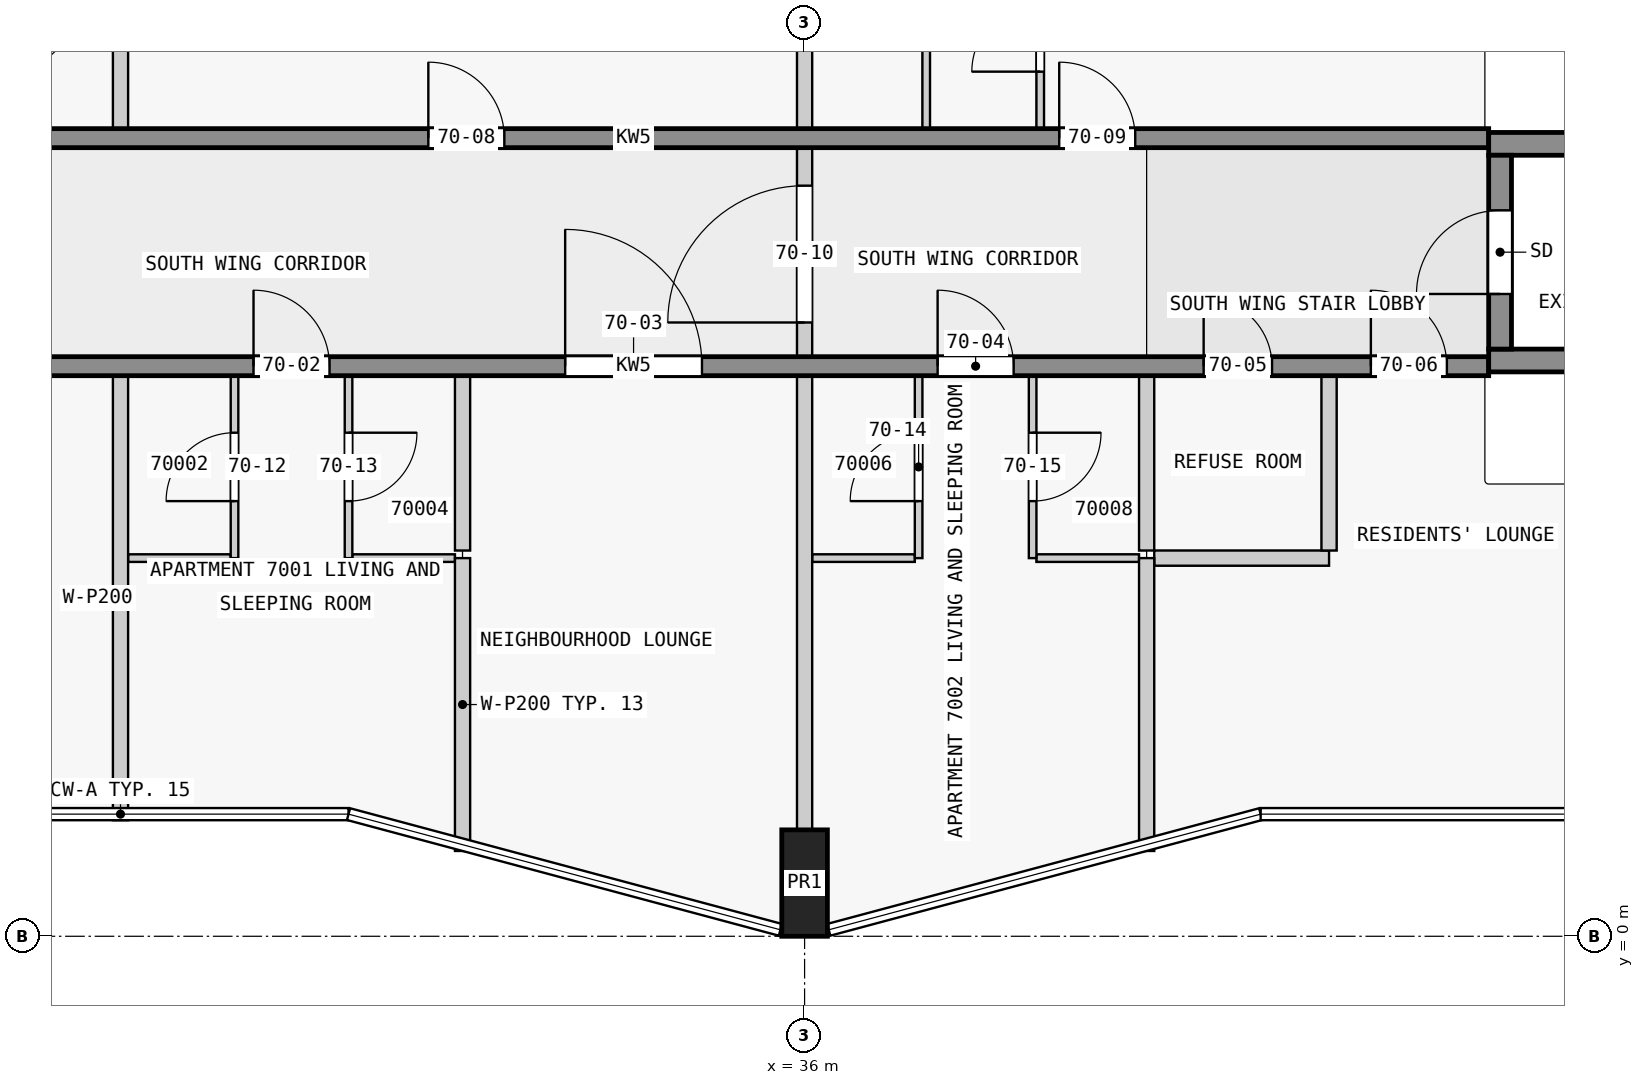
"""IFC4 building model, lengths in metres.
Left out: names, types, materials, properties, quantities, classifications, styles, units other than length and angle.
Written with IfcOpenShell. Run it as: python <this file> out.ifc"""

import sys

from ifc_helpers import new_model, si_unit, direction, frame, frame_2d, origin, origin_2d, place, context, subcontext, project, spatial, rectangle, extrude, element, fill, save


model = new_model("IFC4")
c1 = context("Model", 3, precision=1e-05, world=origin(), true_north=direction((0.0, 1.0)))
c2 = subcontext(c1, "Body", "Model", "MODEL_VIEW")
j1 = project(units=[si_unit("LENGTHUNIT", "METRE"), si_unit("PLANEANGLEUNIT", "RADIAN")], contexts=[c1])
p1 = place(None, origin())
s1 = spatial("IfcSite", under=j1, at=p1, CompositionType="ELEMENT")
p2 = place(p1, origin())
s2 = spatial("IfcBuilding", under=s1, at=p2, CompositionType="ELEMENT")
p3 = place(p2, frame((0.0, 0.0, 266.9)))
s3 = spatial("IfcBuildingStorey", under=s2, at=p3, CompositionType="ELEMENT", Elevation=266.9)
p4 = place(p3, frame((36.0, 0.7, 0.0), z_axis=(0.0, 0.0, 1.0), x_axis=(1.0, 0.0, 0.0)))
e1 = element("IfcColumn", 1, at=p4, inside=s3, PredefinedType="COLUMN", context=c2, shape_type="SweptSolid", body=[
    extrude(rectangle(XDim=0.6, YDim=1.4, at=origin_2d()), origin(), (0.0, 0.0, 1.0), 3.5),
])
p5 = place(p3, frame((45.15, 7.725, 0.0), z_axis=(0.0, 0.0, 1.0), x_axis=(0.0, 1.0, 0.0)))
e2 = element("IfcWall", 2, at=p5, inside=s3, PredefinedType="SHEAR", context=c2, shape_type="SweptSolid", body=[
    extrude(rectangle(XDim=2.55, YDim=0.3, at=frame_2d((1.275, 0.0))), origin(), (0.0, 0.0, 1.0), 3.5),
])
p6 = place(p5, frame((0.725, 0.0, 0.0)))
e3 = element("IfcOpeningElement", 3, at=p6, cuts=e2, PredefinedType="OPENING", context=c2, shape_type="SweptSolid", body=[
    extrude(rectangle(XDim=1.1, YDim=2.1, at=frame_2d((0.55, 1.05))), frame((0.0, 0.16, 0.0), z_axis=(0.0, -1.0, 0.0), x_axis=(1.0, 0.0, 0.0)), (0.0, 0.0, 1.0), 0.32),
])
for number, where, z_axis, x_axis in (
    (4, (45.0, 7.575, 0.0), (0.0, 0.0, 1.0), (1.0, 0.0, 0.0)),
    (5, (45.0, 10.425, 0.0), (0.0, 0.0, 1.0), (1.0, 0.0, 0.0)),
):
    element("IfcWall", number, at=place(p3, frame(where, z_axis=z_axis, x_axis=x_axis)), inside=s3, PredefinedType="SHEAR", context=c2, shape_type="SweptSolid", body=[
        extrude(rectangle(XDim=7.2, YDim=0.3, at=frame_2d((3.6, 0.0))), origin(), (0.0, 0.0, 1.0), 3.5),
    ])
p7 = place(p3, frame((22.5, 7.5, 0.0), z_axis=(0.0, 0.0, 1.0), x_axis=(1.0, 0.0, 0.0)))
e6 = element("IfcWall", 6, at=p7, inside=s3, PredefinedType="SHEAR", context=c2, shape_type="SweptSolid", body=[
    extrude(rectangle(XDim=22.5, YDim=0.25, at=frame_2d((11.25, 0.0))), origin(), (0.0, 0.0, 1.0), 3.25),
])
p8 = place(p7, frame((1.75, 0.0, 0.0)))
e7 = element("IfcOpeningElement", 7, at=p8, cuts=e6, PredefinedType="OPENING", context=c2, shape_type="SweptSolid", body=[
    extrude(rectangle(XDim=1.0, YDim=2.1, at=frame_2d((0.5, 1.05))), frame((0.0, 0.135, 0.0), z_axis=(0.0, -1.0, 0.0), x_axis=(1.0, 0.0, 0.0)), (0.0, 0.0, 1.0), 0.27),
])
p9 = place(p7, frame((6.25, 0.0, 0.0)))
e8 = element("IfcOpeningElement", 8, at=p9, cuts=e6, PredefinedType="OPENING", context=c2, shape_type="SweptSolid", body=[
    extrude(rectangle(XDim=1.0, YDim=2.1, at=frame_2d((0.5, 1.05))), frame((0.0, 0.135, 0.0), z_axis=(0.0, -1.0, 0.0), x_axis=(1.0, 0.0, 0.0)), (0.0, 0.0, 1.0), 0.27),
])
p10 = place(p7, frame((10.35, 0.0, 0.0)))
e9 = element("IfcOpeningElement", 9, at=p10, cuts=e6, PredefinedType="OPENING", context=c2, shape_type="SweptSolid", body=[
    extrude(rectangle(XDim=1.8, YDim=2.1, at=frame_2d((0.9, 1.05))), frame((0.0, 0.135, 0.0), z_axis=(0.0, -1.0, 0.0), x_axis=(1.0, 0.0, 0.0)), (0.0, 0.0, 1.0), 0.27),
])
p11 = place(p7, frame((15.25, 0.0, 0.0)))
e10 = element("IfcOpeningElement", 10, at=p11, cuts=e6, PredefinedType="OPENING", context=c2, shape_type="SweptSolid", body=[
    extrude(rectangle(XDim=1.0, YDim=2.1, at=frame_2d((0.5, 1.05))), frame((0.0, 0.135, 0.0), z_axis=(0.0, -1.0, 0.0), x_axis=(1.0, 0.0, 0.0)), (0.0, 0.0, 1.0), 0.27),
])
p12 = place(p7, frame((18.75, 0.0, 0.0)))
e11 = element("IfcOpeningElement", 11, at=p12, cuts=e6, PredefinedType="OPENING", context=c2, shape_type="SweptSolid", body=[
    extrude(rectangle(XDim=0.9, YDim=2.1, at=frame_2d((0.45, 1.05))), frame((0.0, 0.135, 0.0), z_axis=(0.0, -1.0, 0.0), x_axis=(1.0, 0.0, 0.0)), (0.0, 0.0, 1.0), 0.27),
])
p13 = place(p7, frame((20.95, 0.0, 0.0)))
e12 = element("IfcOpeningElement", 12, at=p13, cuts=e6, PredefinedType="OPENING", context=c2, shape_type="SweptSolid", body=[
    extrude(rectangle(XDim=1.0, YDim=2.1, at=frame_2d((0.5, 1.05))), frame((0.0, 0.135, 0.0), z_axis=(0.0, -1.0, 0.0), x_axis=(1.0, 0.0, 0.0)), (0.0, 0.0, 1.0), 0.27),
])
p14 = place(p3, frame((22.5, 10.5, 0.0), z_axis=(0.0, 0.0, 1.0), x_axis=(1.0, 0.0, 0.0)))
e13 = element("IfcWall", 13, at=p14, inside=s3, PredefinedType="SHEAR", context=c2, shape_type="SweptSolid", body=[
    extrude(rectangle(XDim=22.5, YDim=0.25, at=frame_2d((11.25, 0.0))), origin(), (0.0, 0.0, 1.0), 3.25),
])
p15 = place(p14, frame((1.75, 0.0, 0.0)))
e14 = element("IfcOpeningElement", 14, at=p15, cuts=e13, PredefinedType="OPENING", context=c2, shape_type="SweptSolid", body=[
    extrude(rectangle(XDim=1.0, YDim=2.1, at=frame_2d((0.5, 1.05))), frame((0.0, 0.135, 0.0), z_axis=(0.0, -1.0, 0.0), x_axis=(1.0, 0.0, 0.0)), (0.0, 0.0, 1.0), 0.27),
])
p16 = place(p14, frame((8.55, 0.0, 0.0)))
e15 = element("IfcOpeningElement", 15, at=p16, cuts=e13, PredefinedType="OPENING", context=c2, shape_type="SweptSolid", body=[
    extrude(rectangle(XDim=1.0, YDim=2.1, at=frame_2d((0.5, 1.05))), frame((0.0, 0.135, 0.0), z_axis=(0.0, -1.0, 0.0), x_axis=(1.0, 0.0, 0.0)), (0.0, 0.0, 1.0), 0.27),
])
p17 = place(p14, frame((16.85, 0.0, 0.0)))
e16 = element("IfcOpeningElement", 16, at=p17, cuts=e13, PredefinedType="OPENING", context=c2, shape_type="SweptSolid", body=[
    extrude(rectangle(XDim=1.0, YDim=2.1, at=frame_2d((0.5, 1.05))), frame((0.0, 0.135, 0.0), z_axis=(0.0, -1.0, 0.0), x_axis=(1.0, 0.0, 0.0)), (0.0, 0.0, 1.0), 0.27),
])
for number, where, z_axis, x_axis in (
    (17, (27.1, 4.975, 0.0), (0.0, 0.0, 1.0), (1.0, 0.0, 0.0)),
    (18, (30.05, 4.975, 0.0), (0.0, 0.0, 1.0), (1.0, 0.0, 0.0)),
    (19, (36.1, 4.975, 0.0), (0.0, 0.0, 1.0), (1.0, 0.0, 0.0)),
    (20, (39.05, 4.975, 0.0), (0.0, 0.0, 1.0), (1.0, 0.0, 0.0)),
):
    element("IfcWall", number, at=place(p3, frame(where, z_axis=z_axis, x_axis=x_axis)), inside=s3, PredefinedType="PARTITIONING", context=c2, shape_type="SweptSolid", body=[
        extrude(rectangle(XDim=1.35, YDim=0.1, at=frame_2d((0.675, 0.0))), origin(), (0.0, 0.0, 1.0), 3.25),
    ])
p18 = place(p3, frame((40.6, 4.975, 0.0), z_axis=(0.0, 0.0, 1.0), x_axis=(1.0, 0.0, 0.0)))
e21 = element("IfcWall", 21, at=p18, inside=s3, PredefinedType="PARTITIONING", context=c2, shape_type="SweptSolid", body=[
    extrude(rectangle(XDim=2.3, YDim=0.2, at=frame_2d((1.15, 0.0))), origin(), (0.0, 0.0, 1.0), 3.25),
])
p19 = place(p3, frame((27.0, 1.527, 0.0), z_axis=(0.0, 0.0, 1.0), x_axis=(0.0, 1.0, 0.0)))
e22 = element("IfcWall", 22, at=p19, inside=s3, PredefinedType="PARTITIONING", context=c2, shape_type="SweptSolid", body=[
    extrude(rectangle(XDim=5.848, YDim=0.2, at=frame_2d((2.924, 0.0))), origin(), (0.0, 0.0, 1.0), 3.25),
])
p20 = place(p3, frame((27.0, 10.625, 0.0), z_axis=(0.0, 0.0, 1.0), x_axis=(0.0, 1.0, 0.0)))
e23 = element("IfcWall", 23, at=p20, inside=s3, PredefinedType="PARTITIONING", context=c2, shape_type="SweptSolid", body=[
    extrude(rectangle(XDim=2.3, YDim=0.2, at=frame_2d((1.15, 0.0))), origin(), (0.0, 0.0, 1.0), 3.25),
])
p21 = place(p3, frame((28.5, 4.975, 0.0), z_axis=(0.0, 0.0, 1.0), x_axis=(0.0, 1.0, 0.0)))
e24 = element("IfcWall", 24, at=p21, inside=s3, PredefinedType="PARTITIONING", context=c2, shape_type="SweptSolid", body=[
    extrude(rectangle(XDim=2.4, YDim=0.1, at=frame_2d((1.2, 0.0))), origin(), (0.0, 0.0, 1.0), 3.25),
])
p22 = place(p21, frame((0.75, 0.0, 0.0)))
e25 = element("IfcOpeningElement", 25, at=p22, cuts=e24, PredefinedType="OPENING", context=c2, shape_type="SweptSolid", body=[
    extrude(rectangle(XDim=0.9, YDim=2.1, at=frame_2d((0.45, 1.05))), frame((0.0, 0.06, 0.0), z_axis=(0.0, -1.0, 0.0), x_axis=(1.0, 0.0, 0.0)), (0.0, 0.0, 1.0), 0.12),
])
p23 = place(p3, frame((30.0, 7.375, 0.0), z_axis=(0.0, 0.0, 1.0), x_axis=(0.0, -1.0, 0.0)))
e26 = element("IfcWall", 26, at=p23, inside=s3, PredefinedType="PARTITIONING", context=c2, shape_type="SweptSolid", body=[
    extrude(rectangle(XDim=2.4, YDim=0.1, at=frame_2d((1.2, 0.0))), origin(), (0.0, 0.0, 1.0), 3.25),
])
p24 = place(p23, frame((0.75, 0.0, 0.0)))
e27 = element("IfcOpeningElement", 27, at=p24, cuts=e26, PredefinedType="OPENING", context=c2, shape_type="SweptSolid", body=[
    extrude(rectangle(XDim=0.9, YDim=2.1, at=frame_2d((0.45, 1.05))), frame((0.0, 0.06, 0.0), z_axis=(0.0, -1.0, 0.0), x_axis=(1.0, 0.0, 0.0)), (0.0, 0.0, 1.0), 0.12),
])
p25 = place(p3, frame((31.5, 4.975, 0.0), z_axis=(0.0, 0.0, 1.0), x_axis=(0.0, -1.0, 0.0)))
e28 = element("IfcWall", 28, at=p25, inside=s3, PredefinedType="PARTITIONING", context=c2, shape_type="SweptSolid", body=[
    extrude(rectangle(XDim=3.853, YDim=0.2, at=frame_2d((1.926, 0.0))), origin(), (0.0, 0.0, 1.0), 3.25),
])
p26 = place(p3, frame((31.5, 5.075, 0.0), z_axis=(0.0, 0.0, 1.0), x_axis=(0.0, 1.0, 0.0)))
e29 = element("IfcWall", 29, at=p26, inside=s3, PredefinedType="PARTITIONING", context=c2, shape_type="SweptSolid", body=[
    extrude(rectangle(XDim=2.3, YDim=0.2, at=frame_2d((1.15, 0.0))), origin(), (0.0, 0.0, 1.0), 3.25),
])
for number, where, z_axis, x_axis in (
    (30, (36.0, 1.4, 0.0), (0.0, 0.0, 1.0), (0.0, 1.0, 0.0)),
    (31, (36.0, 10.625, 0.0), (0.0, 0.0, 1.0), (0.0, 1.0, 0.0)),
):
    element("IfcWall", number, at=place(p3, frame(where, z_axis=z_axis, x_axis=x_axis)), inside=s3, PredefinedType="PARTITIONING", context=c2, shape_type="SweptSolid", body=[
        extrude(rectangle(XDim=5.975, YDim=0.2, at=frame_2d((2.988, 0.0))), origin(), (0.0, 0.0, 1.0), 3.25),
    ])
p27 = place(p3, frame((37.5, 4.975, 0.0), z_axis=(0.0, 0.0, 1.0), x_axis=(0.0, 1.0, 0.0)))
e32 = element("IfcWall", 32, at=p27, inside=s3, PredefinedType="PARTITIONING", context=c2, shape_type="SweptSolid", body=[
    extrude(rectangle(XDim=2.4, YDim=0.1, at=frame_2d((1.2, 0.0))), origin(), (0.0, 0.0, 1.0), 3.25),
])
p28 = place(p27, frame((0.75, 0.0, 0.0)))
e33 = element("IfcOpeningElement", 33, at=p28, cuts=e32, PredefinedType="OPENING", context=c2, shape_type="SweptSolid", body=[
    extrude(rectangle(XDim=0.9, YDim=2.1, at=frame_2d((0.45, 1.05))), frame((0.0, 0.06, 0.0), z_axis=(0.0, -1.0, 0.0), x_axis=(1.0, 0.0, 0.0)), (0.0, 0.0, 1.0), 0.12),
])
p29 = place(p3, frame((37.6, 10.625, 0.0), z_axis=(0.0, 0.0, 1.0), x_axis=(0.0, 1.0, 0.0)))
e34 = element("IfcWall", 34, at=p29, inside=s3, PredefinedType="PARTITIONING", context=c2, shape_type="SweptSolid", body=[
    extrude(rectangle(XDim=2.35, YDim=0.1, at=frame_2d((1.175, 0.0))), origin(), (0.0, 0.0, 1.0), 3.25),
])
p30 = place(p3, frame((39.0, 7.375, 0.0), z_axis=(0.0, 0.0, 1.0), x_axis=(0.0, -1.0, 0.0)))
e35 = element("IfcWall", 35, at=p30, inside=s3, PredefinedType="PARTITIONING", context=c2, shape_type="SweptSolid", body=[
    extrude(rectangle(XDim=2.4, YDim=0.1, at=frame_2d((1.2, 0.0))), origin(), (0.0, 0.0, 1.0), 3.25),
])
p31 = place(p30, frame((0.75, 0.0, 0.0)))
e36 = element("IfcOpeningElement", 36, at=p31, cuts=e35, PredefinedType="OPENING", context=c2, shape_type="SweptSolid", body=[
    extrude(rectangle(XDim=0.9, YDim=2.1, at=frame_2d((0.45, 1.05))), frame((0.0, 0.06, 0.0), z_axis=(0.0, -1.0, 0.0), x_axis=(1.0, 0.0, 0.0)), (0.0, 0.0, 1.0), 0.12),
])
p32 = place(p3, frame((39.1, 10.625, 0.0), z_axis=(0.0, 0.0, 1.0), x_axis=(0.0, 1.0, 0.0)))
e37 = element("IfcWall", 37, at=p32, inside=s3, PredefinedType="PARTITIONING", context=c2, shape_type="SweptSolid", body=[
    extrude(rectangle(XDim=2.35, YDim=0.1, at=frame_2d((1.175, 0.0))), origin(), (0.0, 0.0, 1.0), 3.25),
])
p33 = place(p32, frame((0.75, 0.0, 0.0)))
e38 = element("IfcOpeningElement", 38, at=p33, cuts=e37, PredefinedType="OPENING", context=c2, shape_type="SweptSolid", body=[
    extrude(rectangle(XDim=0.9, YDim=2.1, at=frame_2d((0.45, 1.05))), frame((0.0, 0.06, 0.0), z_axis=(0.0, -1.0, 0.0), x_axis=(1.0, 0.0, 0.0)), (0.0, 0.0, 1.0), 0.12),
])
p34 = place(p3, frame((40.5, 4.975, 0.0), z_axis=(0.0, 0.0, 1.0), x_axis=(0.0, -1.0, 0.0)))
e39 = element("IfcWall", 39, at=p34, inside=s3, PredefinedType="PARTITIONING", context=c2, shape_type="SweptSolid", body=[
    extrude(rectangle(XDim=3.853, YDim=0.2, at=frame_2d((1.926, 0.0))), origin(), (0.0, 0.0, 1.0), 3.25),
])
for number, where, z_axis, x_axis in (
    (40, (40.5, 5.075, 0.0), (0.0, 0.0, 1.0), (0.0, 1.0, 0.0)),
    (41, (42.9, 5.075, 0.0), (0.0, 0.0, 1.0), (0.0, 1.0, 0.0)),
):
    element("IfcWall", number, at=place(p3, frame(where, z_axis=z_axis, x_axis=x_axis)), inside=s3, PredefinedType="PARTITIONING", context=c2, shape_type="SweptSolid", body=[
        extrude(rectangle(XDim=2.3, YDim=0.2, at=frame_2d((1.15, 0.0))), origin(), (0.0, 0.0, 1.0), 3.25),
    ])
p35 = place(p3, frame((36.0, 7.475, 0.0), z_axis=(0.0, 0.0, 1.0), x_axis=(0.0, 1.0, 0.0)))
e42 = element("IfcWall", 42, at=p35, inside=s3, PredefinedType="PARTITIONING", context=c2, shape_type="SweptSolid", body=[
    extrude(rectangle(XDim=3.05, YDim=0.2, at=frame_2d((1.525, 0.0))), origin(), (0.0, 0.0, 1.0), 3.25),
])
p36 = place(p35, frame((0.6, 0.0, 0.0)))
e43 = element("IfcOpeningElement", 43, at=p36, cuts=e42, PredefinedType="OPENING", context=c2, shape_type="SweptSolid", body=[
    extrude(rectangle(XDim=1.8, YDim=2.1, at=frame_2d((0.9, 1.05))), frame((0.0, 0.11, 0.0), z_axis=(0.0, -1.0, 0.0), x_axis=(1.0, 0.0, 0.0)), (0.0, 0.0, 1.0), 0.22),
])
p37 = place(p6, origin())
e44 = element("IfcDoor", 44, at=p37, inside=s3, OperationType="SINGLE_SWING_LEFT", PredefinedType="DOOR", context=c2, shape_type="SweptSolid", body=[
    extrude(rectangle(XDim=1.1, YDim=2.1, at=frame_2d((0.55, 1.05))), frame((0.0, 0.025, 0.0), z_axis=(0.0, -1.0, 0.0), x_axis=(1.0, 0.0, 0.0)), (0.0, 0.0, 1.0), 0.05),
])
fill(e3, e44)
p38 = place(p9, origin())
e45 = element("IfcDoor", 45, at=p38, inside=s3, OperationType="SINGLE_SWING_LEFT", PredefinedType="DOOR", context=c2, shape_type="SweptSolid", body=[
    extrude(rectangle(XDim=1.0, YDim=2.1, at=frame_2d((0.5, 1.05))), frame((0.0, 0.025, 0.0), z_axis=(0.0, -1.0, 0.0), x_axis=(1.0, 0.0, 0.0)), (0.0, 0.0, 1.0), 0.05),
])
fill(e8, e45)
p39 = place(p10, origin())
e46 = element("IfcDoor", 46, at=p39, inside=s3, OperationType="SINGLE_SWING_LEFT", PredefinedType="DOOR", context=c2, shape_type="SweptSolid", body=[
    extrude(rectangle(XDim=1.8, YDim=2.1, at=frame_2d((0.9, 1.05))), frame((0.0, 0.025, 0.0), z_axis=(0.0, -1.0, 0.0), x_axis=(1.0, 0.0, 0.0)), (0.0, 0.0, 1.0), 0.05),
])
fill(e9, e46)
p40 = place(p11, origin())
e47 = element("IfcDoor", 47, at=p40, inside=s3, OperationType="SINGLE_SWING_RIGHT", PredefinedType="DOOR", context=c2, shape_type="SweptSolid", body=[
    extrude(rectangle(XDim=1.0, YDim=2.1, at=frame_2d((0.5, 1.05))), frame((0.0, 0.025, 0.0), z_axis=(0.0, -1.0, 0.0), x_axis=(1.0, 0.0, 0.0)), (0.0, 0.0, 1.0), 0.05),
])
fill(e10, e47)
p41 = place(p12, origin())
e48 = element("IfcDoor", 48, at=p41, inside=s3, OperationType="SINGLE_SWING_RIGHT", PredefinedType="DOOR", context=c2, shape_type="SweptSolid", body=[
    extrude(rectangle(XDim=0.9, YDim=2.1, at=frame_2d((0.45, 1.05))), frame((0.0, 0.025, 0.0), z_axis=(0.0, -1.0, 0.0), x_axis=(1.0, 0.0, 0.0)), (0.0, 0.0, 1.0), 0.05),
])
fill(e11, e48)
p42 = place(p13, origin())
e49 = element("IfcDoor", 49, at=p42, inside=s3, OperationType="SINGLE_SWING_RIGHT", PredefinedType="DOOR", context=c2, shape_type="SweptSolid", body=[
    extrude(rectangle(XDim=1.0, YDim=2.1, at=frame_2d((0.5, 1.05))), frame((0.0, 0.025, 0.0), z_axis=(0.0, -1.0, 0.0), x_axis=(1.0, 0.0, 0.0)), (0.0, 0.0, 1.0), 0.05),
])
fill(e12, e49)
p43 = place(p16, origin())
e50 = element("IfcDoor", 50, at=p43, inside=s3, OperationType="SINGLE_SWING_LEFT", PredefinedType="DOOR", context=c2, shape_type="SweptSolid", body=[
    extrude(rectangle(XDim=1.0, YDim=2.1, at=frame_2d((0.5, 1.05))), frame((0.0, 0.025, 0.0), z_axis=(0.0, -1.0, 0.0), x_axis=(1.0, 0.0, 0.0)), (0.0, 0.0, 1.0), 0.05),
])
fill(e15, e50)
p44 = place(p17, origin())
e51 = element("IfcDoor", 51, at=p44, inside=s3, OperationType="SINGLE_SWING_RIGHT", PredefinedType="DOOR", context=c2, shape_type="SweptSolid", body=[
    extrude(rectangle(XDim=1.0, YDim=2.1, at=frame_2d((0.5, 1.05))), frame((0.0, 0.025, 0.0), z_axis=(0.0, -1.0, 0.0), x_axis=(1.0, 0.0, 0.0)), (0.0, 0.0, 1.0), 0.05),
])
fill(e16, e51)
p45 = place(p36, origin())
e52 = element("IfcDoor", 52, at=p45, inside=s3, OperationType="SINGLE_SWING_LEFT", PredefinedType="DOOR", context=c2, shape_type="SweptSolid", body=[
    extrude(rectangle(XDim=1.8, YDim=2.1, at=frame_2d((0.9, 1.05))), frame((0.0, 0.025, 0.0), z_axis=(0.0, -1.0, 0.0), x_axis=(1.0, 0.0, 0.0)), (0.0, 0.0, 1.0), 0.05),
])
fill(e43, e52)
p46 = place(p22, origin())
e53 = element("IfcDoor", 53, at=p46, inside=s3, OperationType="SINGLE_SWING_LEFT", PredefinedType="DOOR", context=c2, shape_type="SweptSolid", body=[
    extrude(rectangle(XDim=0.9, YDim=2.1, at=frame_2d((0.45, 1.05))), frame((0.0, 0.025, 0.0), z_axis=(0.0, -1.0, 0.0), x_axis=(1.0, 0.0, 0.0)), (0.0, 0.0, 1.0), 0.05),
])
fill(e25, e53)
p47 = place(p24, origin())
e54 = element("IfcDoor", 54, at=p47, inside=s3, OperationType="SINGLE_SWING_LEFT", PredefinedType="DOOR", context=c2, shape_type="SweptSolid", body=[
    extrude(rectangle(XDim=0.9, YDim=2.1, at=frame_2d((0.45, 1.05))), frame((0.0, 0.025, 0.0), z_axis=(0.0, -1.0, 0.0), x_axis=(1.0, 0.0, 0.0)), (0.0, 0.0, 1.0), 0.05),
])
fill(e27, e54)
p48 = place(p28, origin())
e55 = element("IfcDoor", 55, at=p48, inside=s3, OperationType="SINGLE_SWING_LEFT", PredefinedType="DOOR", context=c2, shape_type="SweptSolid", body=[
    extrude(rectangle(XDim=0.9, YDim=2.1, at=frame_2d((0.45, 1.05))), frame((0.0, 0.025, 0.0), z_axis=(0.0, -1.0, 0.0), x_axis=(1.0, 0.0, 0.0)), (0.0, 0.0, 1.0), 0.05),
])
fill(e33, e55)
p49 = place(p31, origin())
e56 = element("IfcDoor", 56, at=p49, inside=s3, OperationType="SINGLE_SWING_LEFT", PredefinedType="DOOR", context=c2, shape_type="SweptSolid", body=[
    extrude(rectangle(XDim=0.9, YDim=2.1, at=frame_2d((0.45, 1.05))), frame((0.0, 0.025, 0.0), z_axis=(0.0, -1.0, 0.0), x_axis=(1.0, 0.0, 0.0)), (0.0, 0.0, 1.0), 0.05),
])
fill(e36, e56)
p50 = place(p33, origin())
e57 = element("IfcDoor", 57, at=p50, inside=s3, OperationType="SINGLE_SWING_RIGHT", PredefinedType="DOOR", context=c2, shape_type="SweptSolid", body=[
    extrude(rectangle(XDim=0.9, YDim=2.1, at=frame_2d((0.45, 1.05))), frame((0.0, 0.025, 0.0), z_axis=(0.0, -1.0, 0.0), x_axis=(1.0, 0.0, 0.0)), (0.0, 0.0, 1.0), 0.05),
])
fill(e38, e57)
save(model, sys.argv[1])
